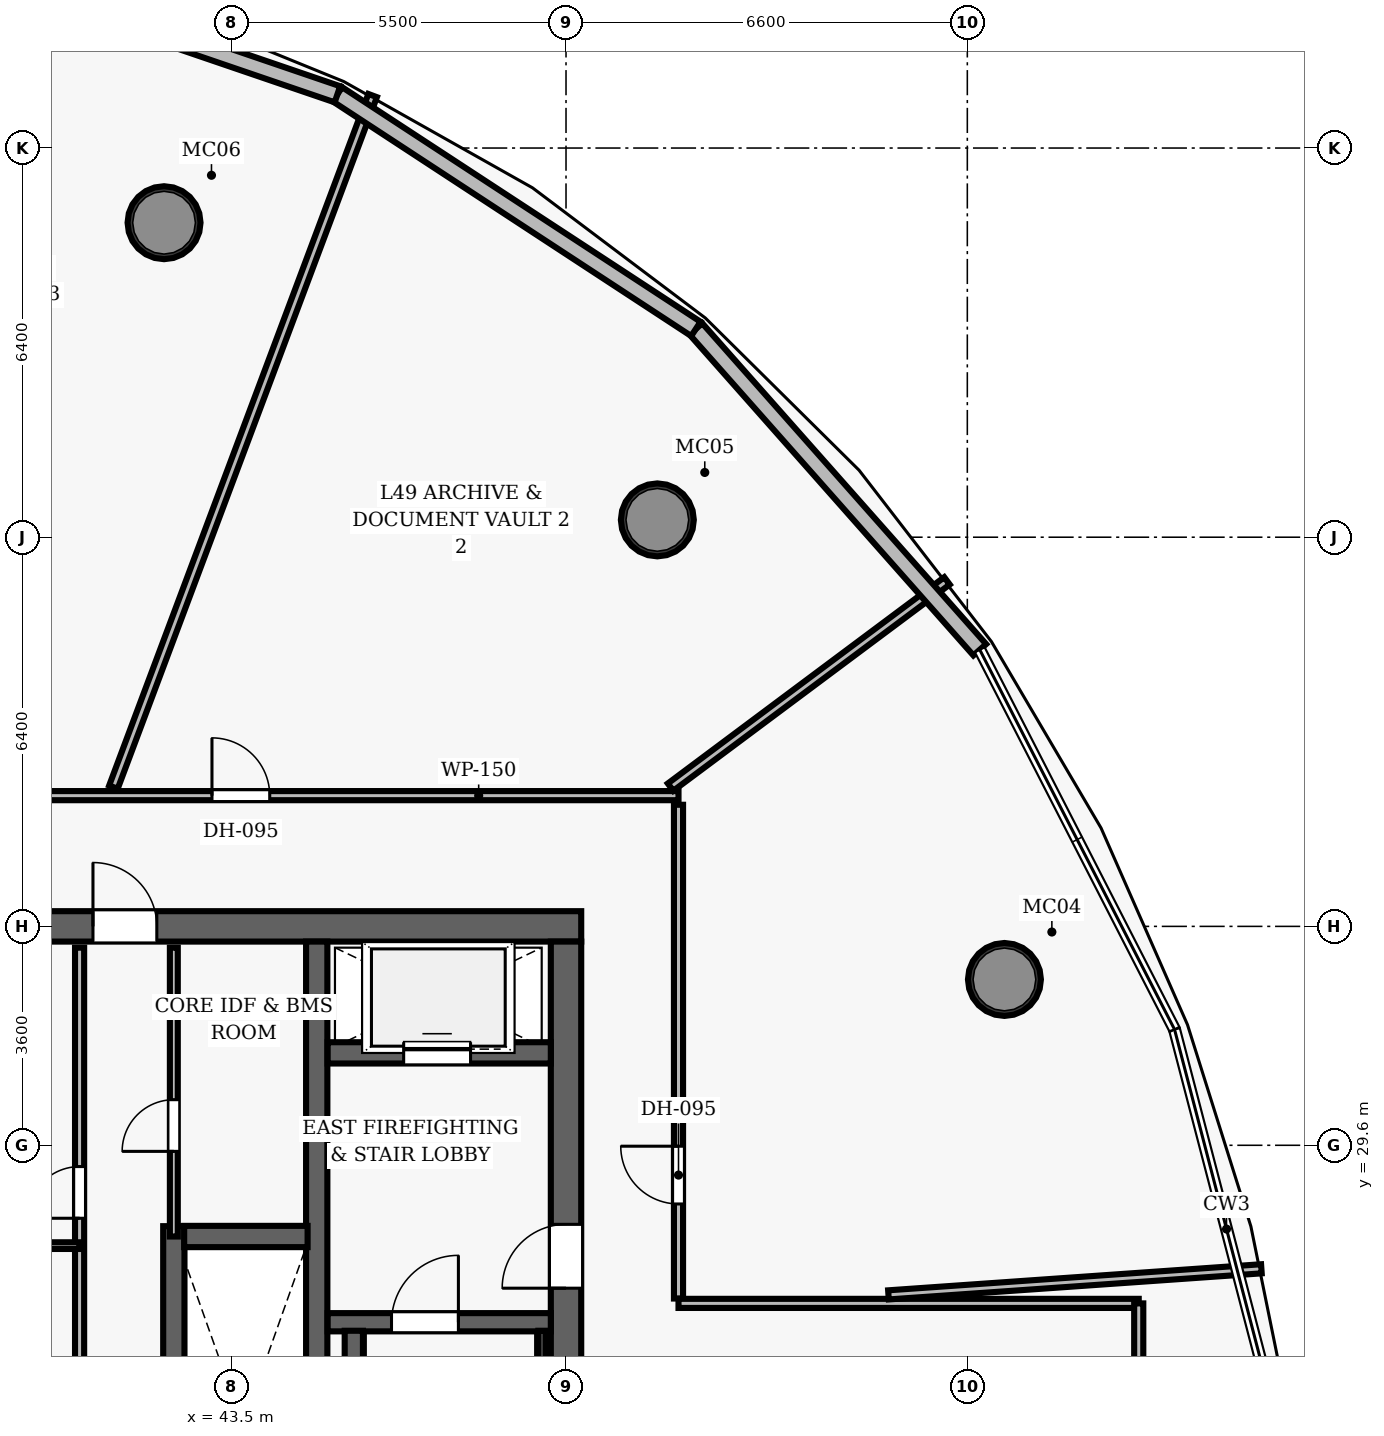
"""IFC4 building model, lengths in metres.
Left out: names, types, materials, properties, quantities, classifications, styles, units other than length and angle.
Written with IfcOpenShell. Run it as: python <this file> out.ifc"""

import sys

from ifc_helpers import new_model, si_unit, direction, frame, frame_2d, origin, origin_2d, place, context, subcontext, project, spatial, rectangle, hollow_circle, extrude, element, fill, save


model = new_model("IFC4")
c1 = context("Model", 3, precision=1e-05, world=origin(), true_north=direction((0.0, 1.0)))
c2 = subcontext(c1, "Body", "Model", "MODEL_VIEW")
j1 = project(units=[si_unit("LENGTHUNIT", "METRE"), si_unit("PLANEANGLEUNIT", "RADIAN")], contexts=[c1])
p1 = place(None, origin())
s1 = spatial("IfcSite", under=j1, at=p1, CompositionType="ELEMENT")
p2 = place(p1, origin())
s2 = spatial("IfcBuilding", under=s1, at=p2, CompositionType="ELEMENT")
p3 = place(p2, frame((0.0, 0.0, 194.3)))
s3 = spatial("IfcBuildingStorey", under=s2, at=p3, CompositionType="ELEMENT", Elevation=194.3)
p4 = place(p3, frame((26.75, 33.2, 0.0), z_axis=(0.0, 0.0, 1.0), x_axis=(1.0, 0.0, 0.0)))
e1 = element("IfcWall", 1, at=p4, inside=s3, PredefinedType="SHEAR", context=c2, shape_type="SweptSolid", body=[
    extrude(rectangle(XDim=22.5, YDim=0.5, at=frame_2d((11.25, 0.0))), origin(), (0.0, 0.0, 1.0), 3.85),
])
p5 = place(p4, frame((4.57, 0.0, 0.0)))
e2 = element("IfcOpeningElement", 2, at=p5, cuts=e1, PredefinedType="OPENING", context=c2, shape_type="SweptSolid", body=[
    extrude(rectangle(XDim=1.05, YDim=2.15, at=frame_2d((0.525, 1.075))), frame((0.0, 0.26, 0.0), z_axis=(0.0, -1.0, 0.0), x_axis=(1.0, 0.0, 0.0)), (0.0, 0.0, 1.0), 0.52),
])
p6 = place(p4, frame((14.47, 0.0, 0.0)))
e3 = element("IfcOpeningElement", 3, at=p6, cuts=e1, PredefinedType="OPENING", context=c2, shape_type="SweptSolid", body=[
    extrude(rectangle(XDim=1.05, YDim=2.15, at=frame_2d((0.525, 1.075))), frame((0.0, 0.26, 0.0), z_axis=(0.0, -1.0, 0.0), x_axis=(1.0, 0.0, 0.0)), (0.0, 0.0, 1.0), 0.52),
])
p7 = place(p3, frame((49.0, 19.05, 0.0), z_axis=(0.0, 0.0, 1.0), x_axis=(0.0, 1.0, 0.0)))
e4 = element("IfcWall", 4, at=p7, inside=s3, PredefinedType="SHEAR", context=c2, shape_type="SweptSolid", body=[
    extrude(rectangle(XDim=13.9, YDim=0.5, at=frame_2d((6.95, 0.0))), origin(), (0.0, 0.0, 1.0), 3.85),
])
p8 = place(p7, frame((8.2, 0.0, 0.0)))
e5 = element("IfcOpeningElement", 5, at=p8, cuts=e4, PredefinedType="OPENING", context=c2, shape_type="SweptSolid", body=[
    extrude(rectangle(XDim=1.05, YDim=2.15, at=frame_2d((0.525, 1.075))), frame((0.0, 0.26, 0.0), z_axis=(0.0, -1.0, 0.0), x_axis=(1.0, 0.0, 0.0)), (0.0, 0.0, 1.0), 0.52),
])
p9 = place(p3, frame((44.9, 19.05, 0.0), z_axis=(0.0, 0.0, 1.0), x_axis=(0.0, 1.0, 0.0)))
e6 = element("IfcWall", 6, at=p9, inside=s3, PredefinedType="SHEAR", context=c2, shape_type="SweptSolid", body=[
    extrude(rectangle(XDim=13.9, YDim=0.35, at=frame_2d((6.95, 0.0))), origin(), (0.0, 0.0, 1.0), 3.85),
])
for number, where, z_axis, x_axis in (
    (7, (56.21, 32.327, 0.0), (0.0, 0.0, 1.0), (1.0, 0.0, 0.0)),
    (8, (50.502, 39.885, 0.0), (0.0, 0.0, 1.0), (1.0, 0.0, 0.0)),
    (9, (42.389, 44.772, 0.0), (0.0, 0.0, 1.0), (1.0, 0.0, 0.0)),
):
    element("IfcColumn", number, at=place(p3, frame(where, z_axis=z_axis, x_axis=x_axis)), inside=s3, PredefinedType="COLUMN", context=c2, shape_type="SweptSolid", body=[
        extrude(hollow_circle(Radius=0.6, WallThickness=0.05, at=origin_2d()), origin(), (0.0, 0.0, 1.0), 3.85),
    ])
p10 = place(p3, frame((45.08, 26.69, 0.0), z_axis=(0.0, 0.0, 1.0), x_axis=(1.0, 0.0, 0.0)))
e10 = element("IfcWall", 10, at=p10, inside=s3, PredefinedType="SHEAR", context=c2, shape_type="SweptSolid", body=[
    extrude(rectangle(XDim=3.67, YDim=0.3, at=frame_2d((1.835, 0.0))), origin(), (0.0, 0.0, 1.0), 3.85),
])
p11 = place(p10, frame((1.05, 0.0, 0.0)))
e11 = element("IfcOpeningElement", 11, at=p11, cuts=e10, PredefinedType="OPENING", context=c2, shape_type="SweptSolid", body=[
    extrude(rectangle(XDim=1.1, YDim=2.15, at=frame_2d((0.55, 1.075))), frame((0.0, 0.16, 0.0), z_axis=(0.0, -1.0, 0.0), x_axis=(1.0, 0.0, 0.0)), (0.0, 0.0, 1.0), 0.32),
])
p12 = place(p3, frame((45.51, 19.05, 0.0), z_axis=(0.0, 0.0, 1.0), x_axis=(0.0, 1.0, 0.0)))
e12 = element("IfcWall", 12, at=p12, inside=s3, PredefinedType="SHEAR", context=c2, shape_type="SweptSolid", body=[
    extrude(rectangle(XDim=7.5, YDim=0.3, at=frame_2d((3.75, 0.0))), origin(), (0.0, 0.0, 1.0), 3.85),
])
p13 = place(p3, frame((48.605, 19.1, 0.0), z_axis=(0.0, 0.0, 1.0), x_axis=(0.0, 1.0, 0.0)))
e13 = element("IfcWall", 13, at=p13, inside=s3, PredefinedType="SHEAR", context=c2, shape_type="SweptSolid", body=[
    extrude(rectangle(XDim=7.45, YDim=0.12, at=frame_2d((3.725, 0.0))), origin(), (0.0, 0.0, 1.0), 3.85),
])
p14 = place(p3, frame((45.08, 31.12, 0.0), z_axis=(0.0, 0.0, 1.0), x_axis=(1.0, 0.0, 0.0)))
e14 = element("IfcWall", 14, at=p14, inside=s3, PredefinedType="SHEAR", context=c2, shape_type="SweptSolid", body=[
    extrude(rectangle(XDim=3.67, YDim=0.35, at=frame_2d((1.835, 0.0))), origin(), (0.0, 0.0, 1.0), 3.035),
])
p15 = place(p14, frame((1.25, 0.0, 0.0)))
e15 = element("IfcOpeningElement", 15, at=p15, cuts=e14, PredefinedType="OPENING", context=c2, shape_type="SweptSolid", body=[
    extrude(rectangle(XDim=1.1, YDim=2.15, at=frame_2d((0.55, 1.075))), frame((0.0, 0.185, 0.0), z_axis=(0.0, -1.0, 0.0), x_axis=(1.0, 0.0, 0.0)), (0.0, 0.0, 1.0), 0.37),
])
p16 = place(p3, frame((42.55, 21.73, 0.0), z_axis=(0.0, 0.0, 1.0), x_axis=(0.0, 1.0, 0.0)))
e16 = element("IfcWall", 16, at=p16, inside=s3, PredefinedType="SHEAR", context=c2, shape_type="SweptSolid", body=[
    extrude(rectangle(XDim=6.54, YDim=0.35, at=frame_2d((3.27, 0.0))), origin(), (0.0, 0.0, 1.0), 3.035),
])
p17 = place(p3, frame((42.72, 28.1, 0.0), z_axis=(0.0, 0.0, 1.0), x_axis=(1.0, 0.0, 0.0)))
e17 = element("IfcWall", 17, at=p17, inside=s3, PredefinedType="SHEAR", context=c2, shape_type="SweptSolid", body=[
    extrude(rectangle(XDim=2.03, YDim=0.35, at=frame_2d((1.015, 0.0))), origin(), (0.0, 0.0, 1.0), 3.035),
])
p18 = place(p3, frame((41.0, 23.05, 0.0), z_axis=(0.0, 0.0, 1.0), x_axis=(0.0, 1.0, 0.0)))
e18 = element("IfcWall", 18, at=p18, inside=s3, PredefinedType="PARTITIONING", context=c2, shape_type="SweptSolid", body=[
    extrude(rectangle(XDim=9.8, YDim=0.15, at=frame_2d((4.9, 0.0))), origin(), (0.0, 0.0, 1.0), 3.035),
])
p19 = place(p18, frame((5.35, 0.0, 0.0)))
e19 = element("IfcOpeningElement", 19, at=p19, cuts=e18, PredefinedType="OPENING", context=c2, shape_type="SweptSolid", body=[
    extrude(rectangle(XDim=0.85, YDim=2.1, at=frame_2d((0.425, 1.05))), frame((0.0, 0.085, 0.0), z_axis=(0.0, -1.0, 0.0), x_axis=(1.0, 0.0, 0.0)), (0.0, 0.0, 1.0), 0.17),
])
p20 = place(p18, frame((0.45, 0.0, 0.0)))
e20 = element("IfcOpeningElement", 20, at=p20, cuts=e18, PredefinedType="OPENING", context=c2, shape_type="SweptSolid", body=[
    extrude(rectangle(XDim=0.85, YDim=2.1, at=frame_2d((0.425, 1.05))), frame((0.0, 0.085, 0.0), z_axis=(0.0, -1.0, 0.0), x_axis=(1.0, 0.0, 0.0)), (0.0, 0.0, 1.0), 0.17),
])
p21 = place(p3, frame((34.75, 27.95, 0.0), z_axis=(0.0, 0.0, 1.0), x_axis=(1.0, 0.0, 0.0)))
e21 = element("IfcWall", 21, at=p21, inside=s3, PredefinedType="PARTITIONING", context=c2, shape_type="SweptSolid", body=[
    extrude(rectangle(XDim=6.25, YDim=0.11, at=frame_2d((3.125, 0.0))), origin(), (0.0, 0.0, 1.0), 3.035),
])
p22 = place(p3, frame((42.55, 28.1, 0.0), z_axis=(0.0, 0.0, 1.0), x_axis=(0.0, 1.0, 0.0)))
e22 = element("IfcWall", 22, at=p22, inside=s3, PredefinedType="PARTITIONING", context=c2, shape_type="SweptSolid", body=[
    extrude(rectangle(XDim=4.75, YDim=0.13, at=frame_2d((2.375, 0.0))), origin(), (0.0, 0.0, 1.0), 3.035),
])
p23 = place(p22, frame((1.4, 0.0, 0.0)))
e23 = element("IfcOpeningElement", 23, at=p23, cuts=e22, PredefinedType="OPENING", context=c2, shape_type="SweptSolid", body=[
    extrude(rectangle(XDim=0.85, YDim=2.1, at=frame_2d((0.425, 1.05))), frame((0.0, 0.075, 0.0), z_axis=(0.0, -1.0, 0.0), x_axis=(1.0, 0.0, 0.0)), (0.0, 0.0, 1.0), 0.15),
])
p24 = place(p3, frame((24.85, 35.35, 0.0), z_axis=(0.0, 0.0, 1.0), x_axis=(1.0, 0.0, 0.0)))
e24 = element("IfcWall", 24, at=p24, inside=s3, PredefinedType="PARTITIONING", context=c2, shape_type="SweptSolid", body=[
    extrude(rectangle(XDim=26.0, YDim=0.15, at=frame_2d((13.0, 0.0))), origin(), (0.0, 0.0, 1.0), 3.035),
])
p25 = place(p24, frame((18.327, 0.0, 0.0)))
e25 = element("IfcOpeningElement", 25, at=p25, cuts=e24, PredefinedType="OPENING", context=c2, shape_type="SweptSolid", body=[
    extrude(rectangle(XDim=0.95, YDim=2.15, at=frame_2d((0.475, 1.075))), frame((0.0, 0.085, 0.0), z_axis=(0.0, -1.0, 0.0), x_axis=(1.0, 0.0, 0.0)), (0.0, 0.0, 1.0), 0.17),
])
p26 = place(p24, frame((11.881, 0.0, 0.0)))
e26 = element("IfcOpeningElement", 26, at=p26, cuts=e24, PredefinedType="OPENING", context=c2, shape_type="SweptSolid", body=[
    extrude(rectangle(XDim=0.95, YDim=2.15, at=frame_2d((0.475, 1.075))), frame((0.0, 0.085, 0.0), z_axis=(0.0, -1.0, 0.0), x_axis=(1.0, 0.0, 0.0)), (0.0, 0.0, 1.0), 0.17),
])
p27 = place(p24, frame((5.711, 0.0, 0.0)))
e27 = element("IfcOpeningElement", 27, at=p27, cuts=e24, PredefinedType="OPENING", context=c2, shape_type="SweptSolid", body=[
    extrude(rectangle(XDim=0.95, YDim=2.15, at=frame_2d((0.475, 1.075))), frame((0.0, 0.085, 0.0), z_axis=(0.0, -1.0, 0.0), x_axis=(1.0, 0.0, 0.0)), (0.0, 0.0, 1.0), 0.17),
])
p28 = place(p3, frame((50.85, 27.08, 0.0), z_axis=(0.0, 0.0, 1.0), x_axis=(0.0, 1.0, 0.0)))
e28 = element("IfcWall", 28, at=p28, inside=s3, PredefinedType="PARTITIONING", context=c2, shape_type="SweptSolid", body=[
    extrude(rectangle(XDim=8.12, YDim=0.15, at=frame_2d((4.06, 0.0))), origin(), (0.0, 0.0, 1.0), 3.035),
])
p29 = place(p28, frame((1.555, 0.0, 0.0)))
e29 = element("IfcOpeningElement", 29, at=p29, cuts=e28, PredefinedType="OPENING", context=c2, shape_type="SweptSolid", body=[
    extrude(rectangle(XDim=0.95, YDim=2.15, at=frame_2d((0.475, 1.075))), frame((0.0, 0.085, 0.0), z_axis=(0.0, -1.0, 0.0), x_axis=(1.0, 0.0, 0.0)), (0.0, 0.0, 1.0), 0.17),
])
p30 = place(p3, frame((50.85, 27.0, 0.0), z_axis=(0.0, 0.0, 1.0), x_axis=(1.0, 0.0, 0.0)))
e30 = element("IfcWall", 30, at=p30, inside=s3, PredefinedType="PARTITIONING", context=c2, shape_type="SweptSolid", body=[
    extrude(rectangle(XDim=7.569, YDim=0.15, at=frame_2d((3.785, 0.0))), origin(), (0.0, 0.0, 1.0), 3.035),
])
p31 = place(p3, frame((58.419, 25.0, 0.0), z_axis=(0.0, 0.0, 1.0), x_axis=(0.0, 1.0, 0.0)))
e31 = element("IfcWall", 31, at=p31, inside=s3, PredefinedType="PARTITIONING", context=c2, shape_type="SweptSolid", body=[
    extrude(rectangle(XDim=2.0, YDim=0.15, at=frame_2d((1.0, 0.0))), origin(), (0.0, 0.0, 1.0), 3.035),
])
p32 = place(p3, frame((54.303, 27.14, 0.0), z_axis=(0.0, 0.0, 1.0), x_axis=(0.997563418291, 0.069765510725, 0.0)))
e32 = element("IfcWall", 32, at=p32, inside=s3, PredefinedType="PARTITIONING", context=c2, shape_type="SweptSolid", body=[
    extrude(rectangle(XDim=6.148, YDim=0.15, at=frame_2d((3.074, 0.0))), origin(), (0.0, 0.0, 1.0), 3.035),
])
p33 = place(p3, frame((50.719, 35.49, 0.0), z_axis=(0.0, 0.0, 1.0), x_axis=(0.801479915385, 0.598021692947, 0.0)))
e33 = element("IfcWall", 33, at=p33, inside=s3, PredefinedType="PARTITIONING", context=c2, shape_type="SweptSolid", body=[
    extrude(rectangle(XDim=5.672, YDim=0.15, at=frame_2d((2.836, 0.0))), origin(), (0.0, 0.0, 1.0), 3.035),
])
p34 = place(p3, frame((41.557, 35.49, 0.0), z_axis=(0.0, 0.0, 1.0), x_axis=(0.350958224888, 0.936391117206, 0.0)))
e34 = element("IfcWall", 34, at=p34, inside=s3, PredefinedType="PARTITIONING", context=c2, shape_type="SweptSolid", body=[
    extrude(rectangle(XDim=12.146, YDim=0.15, at=frame_2d((6.073, 0.0))), origin(), (0.0, 0.0, 1.0), 3.035),
])
p35 = place(p3, frame((51.136, 43.026, 0.0), z_axis=(0.0, 0.0, 1.0), x_axis=(0.662684531264, -0.748898666058, 0.0)))
e35 = element("IfcWall", 35, at=p35, inside=s3, PredefinedType="SOLIDWALL", context=c2, shape_type="SweptSolid", body=[
    extrude(rectangle(XDim=7.045, YDim=0.28, at=frame_2d((3.523, 0.0))), origin(), (0.0, 0.0, 1.0), 3.62),
])
p36 = place(p3, frame((45.24, 46.884, 0.0), z_axis=(0.0, 0.0, 1.0), x_axis=(0.836722302194, -0.547627418059, 0.0)))
e36 = element("IfcWall", 36, at=p36, inside=s3, PredefinedType="SOLIDWALL", context=c2, shape_type="SweptSolid", body=[
    extrude(rectangle(XDim=7.046, YDim=0.28, at=frame_2d((3.523, 0.0))), origin(), (0.0, 0.0, 1.0), 3.62),
])
p37 = place(p3, frame((38.6, 49.152, 0.0), z_axis=(0.0, 0.0, 1.0), x_axis=(0.946319491837, -0.323232763452, 0.0)))
e37 = element("IfcWall", 37, at=p37, inside=s3, PredefinedType="SOLIDWALL", context=c2, shape_type="SweptSolid", body=[
    extrude(rectangle(XDim=7.018, YDim=0.28, at=frame_2d((3.509, 0.0))), origin(), (0.0, 0.0, 1.0), 3.62),
])
p38 = place(p11, origin())
e38 = element("IfcDoor", 38, at=p38, inside=s3, OperationType="SINGLE_SWING_RIGHT", PredefinedType="DOOR", context=c2, shape_type="SweptSolid", body=[
    extrude(rectangle(XDim=1.1, YDim=2.15, at=frame_2d((0.55, 1.075))), frame((0.0, 0.025, 0.0), z_axis=(0.0, -1.0, 0.0), x_axis=(1.0, 0.0, 0.0)), (0.0, 0.0, 1.0), 0.05),
])
fill(e11, e38)
p39 = place(p8, origin())
e39 = element("IfcDoor", 39, at=p39, inside=s3, OperationType="SINGLE_SWING_LEFT", PredefinedType="DOOR", context=c2, shape_type="SweptSolid", body=[
    extrude(rectangle(XDim=1.05, YDim=2.15, at=frame_2d((0.525, 1.075))), frame((0.0, 0.025, 0.0), z_axis=(0.0, -1.0, 0.0), x_axis=(1.0, 0.0, 0.0)), (0.0, 0.0, 1.0), 0.05),
])
fill(e5, e39)
p40 = place(p6, origin())
e40 = element("IfcDoor", 40, at=p40, inside=s3, OperationType="SINGLE_SWING_LEFT", PredefinedType="DOOR", context=c2, shape_type="SweptSolid", body=[
    extrude(rectangle(XDim=1.05, YDim=2.15, at=frame_2d((0.525, 1.075))), frame((0.0, 0.025, 0.0), z_axis=(0.0, -1.0, 0.0), x_axis=(1.0, 0.0, 0.0)), (0.0, 0.0, 1.0), 0.05),
])
fill(e3, e40)
p41 = place(p19, origin())
e41 = element("IfcDoor", 41, at=p41, inside=s3, OperationType="SINGLE_SWING_LEFT", PredefinedType="DOOR", context=c2, shape_type="SweptSolid", body=[
    extrude(rectangle(XDim=0.85, YDim=2.1, at=frame_2d((0.425, 1.05))), frame((0.0, 0.025, 0.0), z_axis=(0.0, -1.0, 0.0), x_axis=(1.0, 0.0, 0.0)), (0.0, 0.0, 1.0), 0.05),
])
fill(e19, e41)
p42 = place(p23, origin())
e42 = element("IfcDoor", 42, at=p42, inside=s3, OperationType="SINGLE_SWING_LEFT", PredefinedType="DOOR", context=c2, shape_type="SweptSolid", body=[
    extrude(rectangle(XDim=0.85, YDim=2.1, at=frame_2d((0.425, 1.05))), frame((0.0, 0.025, 0.0), z_axis=(0.0, -1.0, 0.0), x_axis=(1.0, 0.0, 0.0)), (0.0, 0.0, 1.0), 0.05),
])
fill(e23, e42)
p43 = place(p29, origin())
e43 = element("IfcDoor", 43, at=p43, inside=s3, OperationType="SINGLE_SWING_RIGHT", PredefinedType="DOOR", context=c2, shape_type="SweptSolid", body=[
    extrude(rectangle(XDim=0.95, YDim=2.15, at=frame_2d((0.475, 1.075))), frame((0.0, 0.025, 0.0), z_axis=(0.0, -1.0, 0.0), x_axis=(1.0, 0.0, 0.0)), (0.0, 0.0, 1.0), 0.05),
])
fill(e29, e43)
p44 = place(p25, origin())
e44 = element("IfcDoor", 44, at=p44, inside=s3, OperationType="SINGLE_SWING_LEFT", PredefinedType="DOOR", context=c2, shape_type="SweptSolid", body=[
    extrude(rectangle(XDim=0.95, YDim=2.15, at=frame_2d((0.475, 1.075))), frame((0.0, 0.025, 0.0), z_axis=(0.0, -1.0, 0.0), x_axis=(1.0, 0.0, 0.0)), (0.0, 0.0, 1.0), 0.05),
])
fill(e25, e44)
p45 = place(p15, origin())
e45 = element("IfcDoor", 45, at=p45, inside=s3, OperationType="SLIDING_TO_LEFT", PredefinedType="DOOR", context=c2, shape_type="SweptSolid", body=[
    extrude(rectangle(XDim=1.1, YDim=2.15, at=frame_2d((0.55, 1.075))), frame((0.0, 0.025, 0.0), z_axis=(0.0, -1.0, 0.0), x_axis=(1.0, 0.0, 0.0)), (0.0, 0.0, 1.0), 0.05),
])
fill(e15, e45)
save(model, sys.argv[1])
